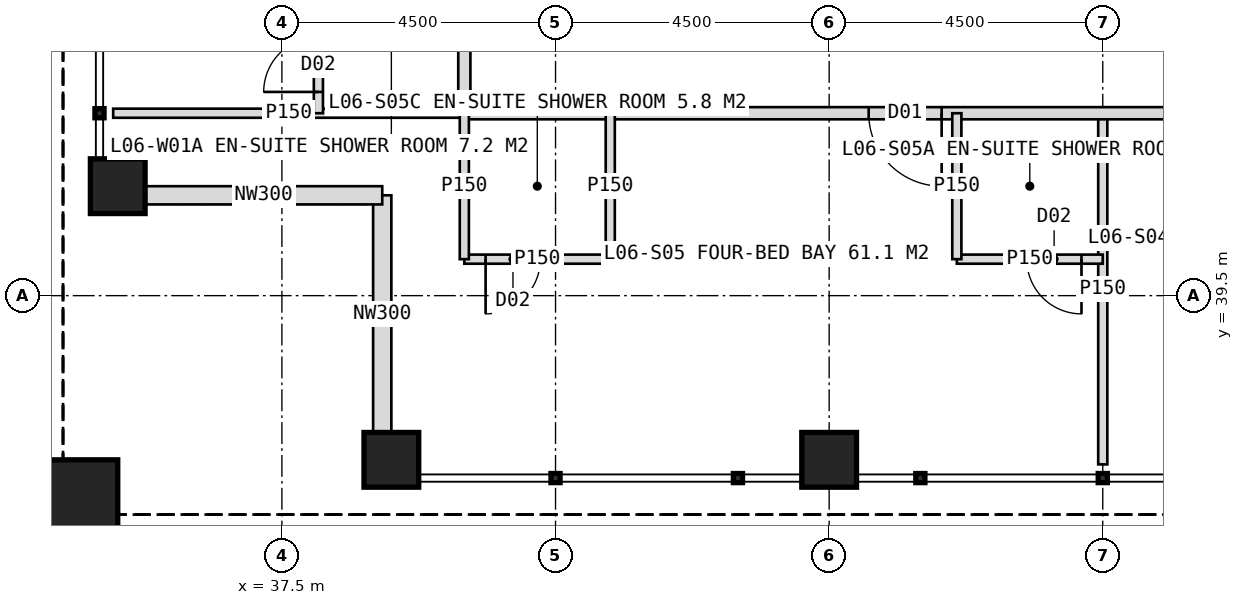
"""IFC4 building model, lengths in metres.
Left out: names, types, materials, properties, quantities, classifications, styles, units other than length and angle.
Written with IfcOpenShell. Run it as: python <this file> out.ifc"""

import sys

from ifc_helpers import new_model, si_unit, direction, frame, frame_2d, origin, origin_2d, place, context, subcontext, project, spatial, rectangle, hollow_rectangle, extrude, element, fill, save


model = new_model("IFC4")
c1 = context("Model", 3, precision=1e-05, world=origin(), true_north=direction((0.0, 1.0)))
c2 = subcontext(c1, "Body", "Model", "MODEL_VIEW")
j1 = project(units=[si_unit("LENGTHUNIT", "METRE"), si_unit("PLANEANGLEUNIT", "RADIAN")], contexts=[c1])
p1 = place(None, origin())
s1 = spatial("IfcSite", under=j1, at=p1, CompositionType="ELEMENT")
p2 = place(p1, origin())
s2 = spatial("IfcBuilding", under=s1, at=p2, CompositionType="ELEMENT")
p3 = place(p2, frame((0.0, 0.0, 31.0)))
s3 = spatial("IfcBuildingStorey", under=s2, at=p3, CompositionType="ELEMENT", Elevation=31.0)
for number, where, z_axis, x_axis in (
    (1, (39.3, 36.8, 0.0), (0.0, 0.0, 1.0), (1.0, 0.0, 0.0)),
    (2, (34.8, 41.3, 0.0), (0.0, 0.0, 1.0), (1.0, 0.0, 0.0)),
    (3, (46.5, 36.8, 0.0), (0.0, 0.0, 1.0), (1.0, 0.0, 0.0)),
):
    element("IfcColumn", number, at=place(p3, frame(where, z_axis=z_axis, x_axis=x_axis)), inside=s3, PredefinedType="COLUMN", context=c2, shape_type="SweptSolid", body=[
        extrude(hollow_rectangle(XDim=0.9, YDim=0.9, WallThickness=0.08, at=origin_2d()), origin(), (0.0, 0.0, 1.0), 4.0),
    ])
p4 = place(p3, frame((33.9, 35.9, 0.0), z_axis=(0.0, 0.0, 1.0), x_axis=(1.0, 0.0, 0.0)))
e4 = element("IfcColumn", 4, at=p4, inside=s3, PredefinedType="COLUMN", context=c2, shape_type="SweptSolid", body=[
    extrude(hollow_rectangle(XDim=1.8, YDim=1.8, WallThickness=0.1, at=origin_2d()), origin(), (0.0, 0.0, 1.0), 4.0),
])
for number, where, z_axis, x_axis in (
    (5, (39.15, 37.25, 0.0), (0.0, 0.0, 1.0), (0.0, 1.0, 0.0)),
    (6, (39.15, 41.15, 0.0), (0.0, 0.0, 1.0), (-1.0, 0.0, 0.0)),
):
    element("IfcWall", number, at=place(p3, frame(where, z_axis=z_axis, x_axis=x_axis)), inside=s3, PredefinedType="ELEMENTEDWALL", context=c2, shape_type="SweptSolid", body=[
        extrude(rectangle(XDim=3.9, YDim=0.3, at=frame_2d((1.95, 0.0))), origin(), (0.0, 0.0, 1.0), 2.95),
    ])
p5 = place(p3, frame((40.5, 42.5, 0.0), z_axis=(0.0, 0.0, 1.0), x_axis=(0.0, 1.0, 0.0)))
e7 = element("IfcWall", 7, at=p5, inside=s3, PredefinedType="PARTITIONING", context=c2, shape_type="SweptSolid", body=[
    extrude(rectangle(XDim=39.0, YDim=0.2, at=frame_2d((19.5, 0.0))), origin(), (0.0, 0.0, 1.0), 3.75),
])
p6 = place(p5, frame((3.25, 0.0, 0.0)))
e8 = element("IfcOpeningElement", 8, at=p6, cuts=e7, PredefinedType="OPENING", context=c2, shape_type="SweptSolid", body=[
    extrude(rectangle(XDim=1.2, YDim=2.2, at=frame_2d((0.6, 1.1))), frame((0.0, 0.11, 0.0), z_axis=(0.0, -1.0, 0.0), x_axis=(1.0, 0.0, 0.0)), (0.0, 0.0, 1.0), 0.22),
])
p7 = place(p5, frame((10.15, 0.0, 0.0)))
e9 = element("IfcOpeningElement", 9, at=p7, cuts=e7, PredefinedType="OPENING", context=c2, shape_type="SweptSolid", body=[
    extrude(rectangle(XDim=1.2, YDim=2.2, at=frame_2d((0.6, 1.1))), frame((0.0, 0.11, 0.0), z_axis=(0.0, -1.0, 0.0), x_axis=(1.0, 0.0, 0.0)), (0.0, 0.0, 1.0), 0.22),
])
p8 = place(p5, frame((16.15, 0.0, 0.0)))
e10 = element("IfcOpeningElement", 10, at=p8, cuts=e7, PredefinedType="OPENING", context=c2, shape_type="SweptSolid", body=[
    extrude(rectangle(XDim=1.2, YDim=2.2, at=frame_2d((0.6, 1.1))), frame((0.0, 0.11, 0.0), z_axis=(0.0, -1.0, 0.0), x_axis=(1.0, 0.0, 0.0)), (0.0, 0.0, 1.0), 0.22),
])
p9 = place(p5, frame((22.75, 0.0, 0.0)))
e11 = element("IfcOpeningElement", 11, at=p9, cuts=e7, PredefinedType="OPENING", context=c2, shape_type="SweptSolid", body=[
    extrude(rectangle(XDim=1.2, YDim=2.2, at=frame_2d((0.6, 1.1))), frame((0.0, 0.11, 0.0), z_axis=(0.0, -1.0, 0.0), x_axis=(1.0, 0.0, 0.0)), (0.0, 0.0, 1.0), 0.22),
])
p10 = place(p5, frame((31.15, 0.0, 0.0)))
e12 = element("IfcOpeningElement", 12, at=p10, cuts=e7, PredefinedType="OPENING", context=c2, shape_type="SweptSolid", body=[
    extrude(rectangle(XDim=1.2, YDim=2.2, at=frame_2d((0.6, 1.1))), frame((0.0, 0.11, 0.0), z_axis=(0.0, -1.0, 0.0), x_axis=(1.0, 0.0, 0.0)), (0.0, 0.0, 1.0), 0.22),
])
p11 = place(p3, frame((40.5, 42.5, 0.0), z_axis=(0.0, 0.0, 1.0), x_axis=(-1.0, 0.0, 0.0)))
e13 = element("IfcWall", 13, at=p11, inside=s3, PredefinedType="PARTITIONING", context=c2, shape_type="SweptSolid", body=[
    extrude(rectangle(XDim=5.775, YDim=0.15, at=frame_2d((2.887, 0.0))), origin(), (0.0, 0.0, 1.0), 3.75),
])
p12 = place(p3, frame((38.1, 42.5, 0.0), z_axis=(0.0, 0.0, 1.0), x_axis=(0.0, 1.0, 0.0)))
e14 = element("IfcWall", 14, at=p12, inside=s3, PredefinedType="PARTITIONING", context=c2, shape_type="SweptSolid", body=[
    extrude(rectangle(XDim=3.0, YDim=0.15, at=frame_2d((1.5, 0.0))), origin(), (0.0, 0.0, 1.0), 3.75),
])
p13 = place(p12, frame((0.35, 0.0, 0.0)))
e15 = element("IfcOpeningElement", 15, at=p13, cuts=e14, PredefinedType="OPENING", context=c2, shape_type="SweptSolid", body=[
    extrude(rectangle(XDim=0.9, YDim=2.1, at=frame_2d((0.45, 1.05))), frame((0.0, 0.085, 0.0), z_axis=(0.0, -1.0, 0.0), x_axis=(1.0, 0.0, 0.0)), (0.0, 0.0, 1.0), 0.17),
])
p14 = place(p3, frame((51.0, 42.5, 0.0), z_axis=(0.0, 0.0, 1.0), x_axis=(0.0, -1.0, 0.0)))
e16 = element("IfcWall", 16, at=p14, inside=s3, PredefinedType="PARTITIONING", context=c2, shape_type="SweptSolid", body=[
    extrude(rectangle(XDim=5.775, YDim=0.15, at=frame_2d((2.887, 0.0))), origin(), (0.0, 0.0, 1.0), 3.75),
])
p15 = place(p3, frame((79.5, 42.5, 0.0), z_axis=(0.0, 0.0, 1.0), x_axis=(-1.0, 0.0, 0.0)))
e17 = element("IfcWall", 17, at=p15, inside=s3, PredefinedType="PARTITIONING", context=c2, shape_type="SweptSolid", body=[
    extrude(rectangle(XDim=39.0, YDim=0.2, at=frame_2d((19.5, 0.0))), origin(), (0.0, 0.0, 1.0), 3.75),
])
p16 = place(p15, frame((3.25, 0.0, 0.0)))
e18 = element("IfcOpeningElement", 18, at=p16, cuts=e17, PredefinedType="OPENING", context=c2, shape_type="SweptSolid", body=[
    extrude(rectangle(XDim=1.2, YDim=2.2, at=frame_2d((0.6, 1.1))), frame((0.0, 0.11, 0.0), z_axis=(0.0, -1.0, 0.0), x_axis=(1.0, 0.0, 0.0)), (0.0, 0.0, 1.0), 0.22),
])
p17 = place(p15, frame((10.15, 0.0, 0.0)))
e19 = element("IfcOpeningElement", 19, at=p17, cuts=e17, PredefinedType="OPENING", context=c2, shape_type="SweptSolid", body=[
    extrude(rectangle(XDim=1.2, YDim=2.2, at=frame_2d((0.6, 1.1))), frame((0.0, 0.11, 0.0), z_axis=(0.0, -1.0, 0.0), x_axis=(1.0, 0.0, 0.0)), (0.0, 0.0, 1.0), 0.22),
])
p18 = place(p15, frame((16.15, 0.0, 0.0)))
e20 = element("IfcOpeningElement", 20, at=p18, cuts=e17, PredefinedType="OPENING", context=c2, shape_type="SweptSolid", body=[
    extrude(rectangle(XDim=1.2, YDim=2.2, at=frame_2d((0.6, 1.1))), frame((0.0, 0.11, 0.0), z_axis=(0.0, -1.0, 0.0), x_axis=(1.0, 0.0, 0.0)), (0.0, 0.0, 1.0), 0.22),
])
p19 = place(p15, frame((22.75, 0.0, 0.0)))
e21 = element("IfcOpeningElement", 21, at=p19, cuts=e17, PredefinedType="OPENING", context=c2, shape_type="SweptSolid", body=[
    extrude(rectangle(XDim=1.2, YDim=2.2, at=frame_2d((0.6, 1.1))), frame((0.0, 0.11, 0.0), z_axis=(0.0, -1.0, 0.0), x_axis=(1.0, 0.0, 0.0)), (0.0, 0.0, 1.0), 0.22),
])
p20 = place(p15, frame((31.15, 0.0, 0.0)))
e22 = element("IfcOpeningElement", 22, at=p20, cuts=e17, PredefinedType="OPENING", context=c2, shape_type="SweptSolid", body=[
    extrude(rectangle(XDim=1.2, YDim=2.2, at=frame_2d((0.6, 1.1))), frame((0.0, 0.11, 0.0), z_axis=(0.0, -1.0, 0.0), x_axis=(1.0, 0.0, 0.0)), (0.0, 0.0, 1.0), 0.22),
])
p21 = place(p3, frame((51.0, 40.1, 0.0), z_axis=(0.0, 0.0, 1.0), x_axis=(-1.0, 0.0, 0.0)))
e23 = element("IfcWall", 23, at=p21, inside=s3, PredefinedType="PARTITIONING", context=c2, shape_type="SweptSolid", body=[
    extrude(rectangle(XDim=2.4, YDim=0.15, at=frame_2d((1.2, 0.0))), origin(), (0.0, 0.0, 1.0), 3.75),
])
p22 = place(p21, frame((0.35, 0.0, 0.0)))
e24 = element("IfcOpeningElement", 24, at=p22, cuts=e23, PredefinedType="OPENING", context=c2, shape_type="SweptSolid", body=[
    extrude(rectangle(XDim=0.9, YDim=2.1, at=frame_2d((0.45, 1.05))), frame((0.0, 0.085, 0.0), z_axis=(0.0, -1.0, 0.0), x_axis=(1.0, 0.0, 0.0)), (0.0, 0.0, 1.0), 0.17),
])
p23 = place(p3, frame((48.6, 42.5, 0.0), z_axis=(0.0, 0.0, 1.0), x_axis=(0.0, -1.0, 0.0)))
e25 = element("IfcWall", 25, at=p23, inside=s3, PredefinedType="PARTITIONING", context=c2, shape_type="SweptSolid", body=[
    extrude(rectangle(XDim=2.4, YDim=0.15, at=frame_2d((1.2, 0.0))), origin(), (0.0, 0.0, 1.0), 3.75),
])
p24 = place(p3, frame((42.9, 40.1, 0.0), z_axis=(0.0, 0.0, 1.0), x_axis=(-1.0, 0.0, 0.0)))
e26 = element("IfcWall", 26, at=p24, inside=s3, PredefinedType="PARTITIONING", context=c2, shape_type="SweptSolid", body=[
    extrude(rectangle(XDim=2.4, YDim=0.15, at=frame_2d((1.2, 0.0))), origin(), (0.0, 0.0, 1.0), 3.75),
])
p25 = place(p24, frame((1.15, 0.0, 0.0)))
e27 = element("IfcOpeningElement", 27, at=p25, cuts=e26, PredefinedType="OPENING", context=c2, shape_type="SweptSolid", body=[
    extrude(rectangle(XDim=0.9, YDim=2.1, at=frame_2d((0.45, 1.05))), frame((0.0, 0.085, 0.0), z_axis=(0.0, -1.0, 0.0), x_axis=(1.0, 0.0, 0.0)), (0.0, 0.0, 1.0), 0.17),
])
for number, where, z_axis, x_axis in (
    (28, (42.9, 42.5, 0.0), (0.0, 0.0, 1.0), (0.0, -1.0, 0.0)),
    (29, (40.5, 42.5, 0.0), (0.0, 0.0, 1.0), (0.0, -1.0, 0.0)),
):
    element("IfcWall", number, at=place(p3, frame(where, z_axis=z_axis, x_axis=x_axis)), inside=s3, PredefinedType="PARTITIONING", context=c2, shape_type="SweptSolid", body=[
        extrude(rectangle(XDim=2.4, YDim=0.15, at=frame_2d((1.2, 0.0))), origin(), (0.0, 0.0, 1.0), 3.75),
    ])
p26 = place(p13, origin())
e30 = element("IfcDoor", 30, at=p26, inside=s3, OperationType="SINGLE_SWING_LEFT", PredefinedType="DOOR", context=c2, shape_type="SweptSolid", body=[
    extrude(rectangle(XDim=0.9, YDim=2.1, at=frame_2d((0.45, 1.05))), frame((0.0, 0.025, 0.0), z_axis=(0.0, -1.0, 0.0), x_axis=(1.0, 0.0, 0.0)), (0.0, 0.0, 1.0), 0.05),
])
fill(e15, e30)
p27 = place(p20, origin())
e31 = element("IfcDoor", 31, at=p27, inside=s3, OperationType="SINGLE_SWING_LEFT", PredefinedType="DOOR", context=c2, shape_type="SweptSolid", body=[
    extrude(rectangle(XDim=1.2, YDim=2.2, at=frame_2d((0.6, 1.1))), frame((0.0, 0.025, 0.0), z_axis=(0.0, -1.0, 0.0), x_axis=(1.0, 0.0, 0.0)), (0.0, 0.0, 1.0), 0.05),
])
fill(e22, e31)
p28 = place(p22, origin())
e32 = element("IfcDoor", 32, at=p28, inside=s3, OperationType="SINGLE_SWING_LEFT", PredefinedType="DOOR", context=c2, shape_type="SweptSolid", body=[
    extrude(rectangle(XDim=0.9, YDim=2.1, at=frame_2d((0.45, 1.05))), frame((0.0, 0.025, 0.0), z_axis=(0.0, -1.0, 0.0), x_axis=(1.0, 0.0, 0.0)), (0.0, 0.0, 1.0), 0.05),
])
fill(e24, e32)
p29 = place(p25, origin())
e33 = element("IfcDoor", 33, at=p29, inside=s3, OperationType="SINGLE_SWING_RIGHT", PredefinedType="DOOR", context=c2, shape_type="SweptSolid", body=[
    extrude(rectangle(XDim=0.9, YDim=2.1, at=frame_2d((0.45, 1.05))), frame((0.0, 0.025, 0.0), z_axis=(0.0, -1.0, 0.0), x_axis=(1.0, 0.0, 0.0)), (0.0, 0.0, 1.0), 0.05),
])
fill(e27, e33)
save(model, sys.argv[1])
